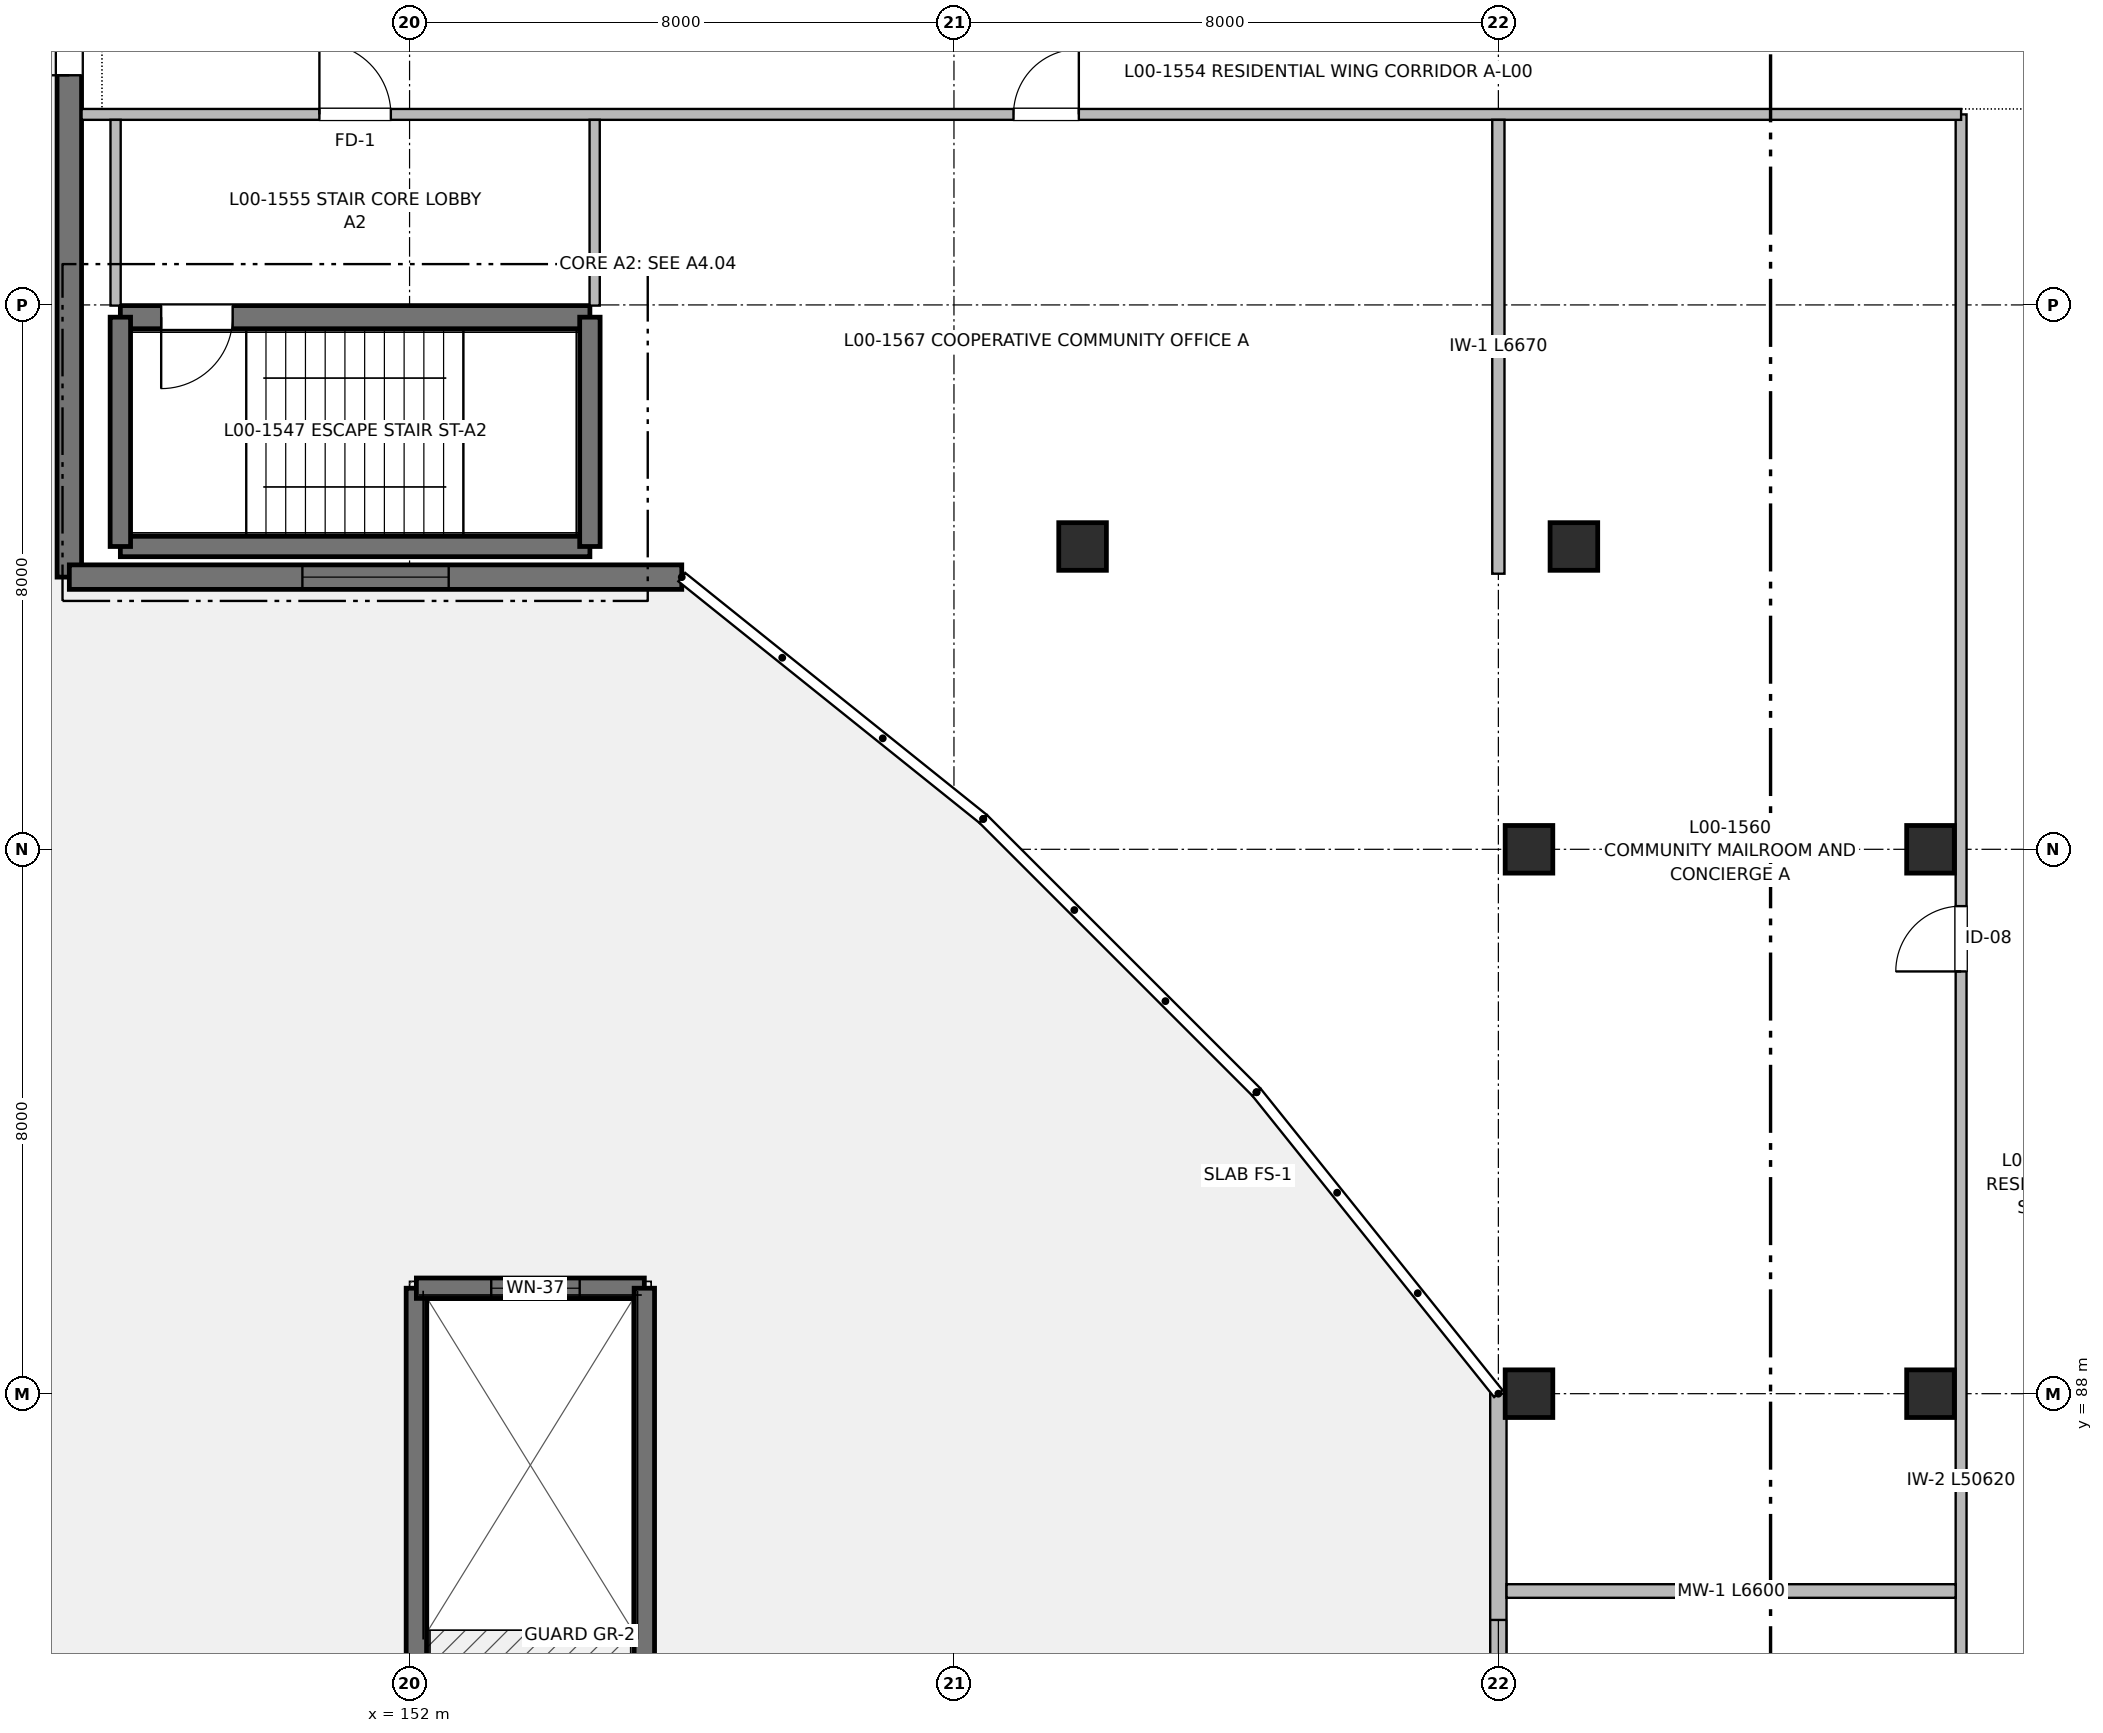
"""IFC4 building model, lengths in metres.
Left out: names, types, materials, properties, quantities, classifications, styles, units other than length and angle.
Written with IfcOpenShell. Run it as: python <this file> out.ifc"""

import sys

from ifc_helpers import new_model, si_unit, direction, frame, frame_2d, origin, origin_2d, place, context, subcontext, project, spatial, rectangle, extrude, element, fill, save


model = new_model("IFC4")
c1 = context("Model", 3, precision=1e-05, world=origin(), true_north=direction((0.0, 1.0)))
c2 = subcontext(c1, "Body", "Model", "MODEL_VIEW")
j1 = project(units=[si_unit("LENGTHUNIT", "METRE"), si_unit("PLANEANGLEUNIT", "RADIAN")], contexts=[c1])
p1 = place(None, origin())
s1 = spatial("IfcSite", under=j1, at=p1, CompositionType="ELEMENT")
p2 = place(p1, origin())
s2 = spatial("IfcBuilding", under=s1, at=p2, CompositionType="ELEMENT")
p3 = place(p2, origin())
s3 = spatial("IfcBuildingStorey", under=s2, at=p3, CompositionType="ELEMENT", Elevation=0.0)
for number, where, z_axis, x_axis in (
    (1, (161.89, 100.45, 0.0), (0.0, 0.0, 1.0), (1.0, 0.0, 0.0)),
    (2, (168.45, 88.0, 0.0), (0.0, 0.0, 1.0), (1.0, 0.0, 0.0)),
    (3, (168.45, 96.0, 0.0), (0.0, 0.0, 1.0), (1.0, 0.0, 0.0)),
    (4, (169.11, 100.45, 0.0), (0.0, 0.0, 1.0), (1.0, 0.0, 0.0)),
    (5, (174.35, 88.0, 0.0), (0.0, 0.0, 1.0), (1.0, 0.0, 0.0)),
    (6, (174.35, 96.0, 0.0), (0.0, 0.0, 1.0), (1.0, 0.0, 0.0)),
):
    element("IfcColumn", number, at=place(p3, frame(where, z_axis=z_axis, x_axis=x_axis)), inside=s3, PredefinedType="COLUMN", context=c2, shape_type="SweptSolid", body=[
        extrude(rectangle(XDim=0.7, YDim=0.7, at=origin_2d()), origin(), (0.0, 0.0, 1.0), 4.16),
    ])
p4 = place(p3, frame((152.1, 82.65, 0.0), z_axis=(0.0, 0.0, 1.0), x_axis=(0.0, 1.0, 0.0)))
e7 = element("IfcWall", 7, at=p4, inside=s3, PredefinedType="SHEAR", context=c2, shape_type="SweptSolid", body=[
    extrude(rectangle(XDim=6.9, YDim=0.3, at=frame_2d((3.45, 0.0))), origin(), (0.0, 0.0, 1.0), 2.65),
])
p5 = place(p3, frame((152.1, 89.55, 0.0), z_axis=(0.0, 0.0, 1.0), x_axis=(1.0, 0.0, 0.0)))
e8 = element("IfcWall", 8, at=p5, inside=s3, PredefinedType="SHEAR", context=c2, shape_type="SweptSolid", body=[
    extrude(rectangle(XDim=3.35, YDim=0.3, at=frame_2d((1.675, 0.0))), origin(), (0.0, 0.0, 1.0), 2.65),
])
p6 = place(p5, frame((1.1, 0.0, 1.45)))
e9 = element("IfcOpeningElement", 9, at=p6, cuts=e8, PredefinedType="OPENING", context=c2, shape_type="SweptSolid", body=[
    extrude(rectangle(XDim=1.3, YDim=0.85, at=frame_2d((0.65, 0.425))), frame((0.0, 0.16, 0.0), z_axis=(0.0, -1.0, 0.0), x_axis=(1.0, 0.0, 0.0)), (0.0, 0.0, 1.0), 0.32),
])
p7 = place(p3, frame((155.45, 89.55, 0.0), z_axis=(0.0, 0.0, 1.0), x_axis=(0.0, -1.0, 0.0)))
e10 = element("IfcWall", 10, at=p7, inside=s3, PredefinedType="SHEAR", context=c2, shape_type="SweptSolid", body=[
    extrude(rectangle(XDim=6.9, YDim=0.3, at=frame_2d((3.45, 0.0))), origin(), (0.0, 0.0, 1.0), 2.65),
])
p8 = place(p3, frame((147.75, 100.45, 0.0), z_axis=(0.0, 0.0, 1.0), x_axis=(1.0, 0.0, 0.0)))
e11 = element("IfcWall", 11, at=p8, inside=s3, PredefinedType="SHEAR", context=c2, shape_type="SweptSolid", body=[
    extrude(rectangle(XDim=6.9, YDim=0.3, at=frame_2d((3.45, 0.0))), origin(), (0.0, 0.0, 1.0), 4.16),
])
p9 = place(p3, frame((154.65, 103.82, 0.0), z_axis=(0.0, 0.0, 1.0), x_axis=(-1.0, 0.0, 0.0)))
e12 = element("IfcWall", 12, at=p9, inside=s3, PredefinedType="SHEAR", context=c2, shape_type="SweptSolid", body=[
    extrude(rectangle(XDim=6.9, YDim=0.34, at=frame_2d((3.45, 0.0))), origin(), (0.0, 0.0, 1.0), 4.16),
])
p10 = place(p9, frame((5.25, 0.0, 0.0)))
e13 = element("IfcOpeningElement", 13, at=p10, cuts=e12, PredefinedType="OPENING", context=c2, shape_type="SweptSolid", body=[
    extrude(rectangle(XDim=1.05, YDim=2.15, at=frame_2d((0.525, 1.075))), frame((0.0, 0.18, 0.0), z_axis=(0.0, -1.0, 0.0), x_axis=(1.0, 0.0, 0.0)), (0.0, 0.0, 1.0), 0.36),
])
for number, where, z_axis, x_axis in (
    (14, (147.75, 103.82, 0.0), (0.0, 0.0, 1.0), (0.0, -1.0, 0.0)),
    (15, (154.65, 100.45, 0.0), (0.0, 0.0, 1.0), (0.0, 1.0, 0.0)),
):
    element("IfcWall", number, at=place(p3, frame(where, z_axis=z_axis, x_axis=x_axis)), inside=s3, PredefinedType="SHEAR", context=c2, shape_type="SweptSolid", body=[
        extrude(rectangle(XDim=3.37, YDim=0.3, at=frame_2d((1.685, 0.0))), origin(), (0.0, 0.0, 1.0), 4.16),
    ])
p11 = place(p3, frame((147.0, 100.0, 0.0), z_axis=(0.0, 0.0, 1.0), x_axis=(0.0, 1.0, 0.0)))
e16 = element("IfcWall", 16, at=p11, inside=s3, PredefinedType="SHEAR", context=c2, shape_type="SweptSolid", body=[
    extrude(rectangle(XDim=16.0, YDim=0.36, at=frame_2d((8.0, 0.0))), origin(), (0.0, 0.0, 1.0), 3.94),
])
p12 = place(p11, frame((7.375, 0.0, 0.0)))
e17 = element("IfcOpeningElement", 17, at=p12, cuts=e16, PredefinedType="OPENING", context=c2, shape_type="SweptSolid", body=[
    extrude(rectangle(XDim=1.25, YDim=2.2, at=frame_2d((0.625, 1.1))), frame((0.0, 0.19, 0.0), z_axis=(0.0, -1.0, 0.0), x_axis=(1.0, 0.0, 0.0)), (0.0, 0.0, 1.0), 0.38),
])
p13 = place(p11, frame((11.325, 0.0, 0.95)))
e18 = element("IfcOpeningElement", 18, at=p13, cuts=e16, PredefinedType="OPENING", context=c2, shape_type="SweptSolid", body=[
    extrude(rectangle(XDim=1.35, YDim=1.3, at=frame_2d((0.675, 0.65))), frame((0.0, 0.19, 0.0), z_axis=(0.0, -1.0, 0.0), x_axis=(1.0, 0.0, 0.0)), (0.0, 0.0, 1.0), 0.38),
])
p14 = place(p3, frame((156.0, 100.0, 0.0), z_axis=(0.0, 0.0, 1.0), x_axis=(-1.0, 0.0, 0.0)))
e19 = element("IfcWall", 19, at=p14, inside=s3, PredefinedType="SHEAR", context=c2, shape_type="SweptSolid", body=[
    extrude(rectangle(XDim=9.0, YDim=0.36, at=frame_2d((4.5, 0.0))), origin(), (0.0, 0.0, 1.0), 3.94),
])
p15 = place(p14, frame((3.425, 0.0, 0.95)))
e20 = element("IfcOpeningElement", 20, at=p15, cuts=e19, PredefinedType="OPENING", context=c2, shape_type="SweptSolid", body=[
    extrude(rectangle(XDim=2.15, YDim=1.8, at=frame_2d((1.075, 0.9))), frame((0.0, 0.19, 0.0), z_axis=(0.0, -1.0, 0.0), x_axis=(1.0, 0.0, 0.0)), (0.0, 0.0, 1.0), 0.38),
])
p16 = place(p3, frame((168.0, 56.0, 0.0), z_axis=(0.0, 0.0, 1.0), x_axis=(0.0, 1.0, 0.0)))
e21 = element("IfcWall", 21, at=p16, inside=s3, PredefinedType="SOLIDWALL", context=c2, shape_type="SweptSolid", body=[
    extrude(rectangle(XDim=32.0, YDim=0.24, at=frame_2d((16.0, 0.0))), origin(), (0.0, 0.0, 1.0), 3.94),
])
p17 = place(p16, frame((3.3, 0.0, 0.0)))
e22 = element("IfcOpeningElement", 22, at=p17, cuts=e21, PredefinedType="OPENING", context=c2, shape_type="SweptSolid", body=[
    extrude(rectangle(XDim=1.3, YDim=2.2, at=frame_2d((0.65, 1.1))), frame((0.0, 0.13, 0.0), z_axis=(0.0, -1.0, 0.0), x_axis=(1.0, 0.0, 0.0)), (0.0, 0.0, 1.0), 0.26),
])
p18 = place(p16, frame((11.325, 0.0, 0.95)))
e23 = element("IfcOpeningElement", 23, at=p18, cuts=e21, PredefinedType="OPENING", context=c2, shape_type="SweptSolid", body=[
    extrude(rectangle(XDim=1.35, YDim=1.3, at=frame_2d((0.675, 0.65))), frame((0.0, 0.13, 0.0), z_axis=(0.0, -1.0, 0.0), x_axis=(1.0, 0.0, 0.0)), (0.0, 0.0, 1.0), 0.26),
])
p19 = place(p16, frame((18.925, 0.0, 0.95)))
e24 = element("IfcOpeningElement", 24, at=p19, cuts=e21, PredefinedType="OPENING", context=c2, shape_type="SweptSolid", body=[
    extrude(rectangle(XDim=2.15, YDim=1.8, at=frame_2d((1.075, 0.9))), frame((0.0, 0.13, 0.0), z_axis=(0.0, -1.0, 0.0), x_axis=(1.0, 0.0, 0.0)), (0.0, 0.0, 1.0), 0.26),
])
p20 = place(p16, frame((27.325, 0.0, 0.95)))
e25 = element("IfcOpeningElement", 25, at=p20, cuts=e21, PredefinedType="OPENING", context=c2, shape_type="SweptSolid", body=[
    extrude(rectangle(XDim=1.35, YDim=1.3, at=frame_2d((0.675, 0.65))), frame((0.0, 0.13, 0.0), z_axis=(0.0, -1.0, 0.0), x_axis=(1.0, 0.0, 0.0)), (0.0, 0.0, 1.0), 0.26),
])
p21 = place(p3, frame((174.8, 56.18, 0.0), z_axis=(0.0, 0.0, 1.0), x_axis=(0.0, 1.0, 0.0)))
e26 = element("IfcWall", 26, at=p21, inside=s3, PredefinedType="PARTITIONING", context=c2, shape_type="SweptSolid", body=[
    extrude(rectangle(XDim=50.62, YDim=0.16, at=frame_2d((25.31, 0.0))), origin(), (0.0, 0.0, 1.0), 3.895),
])
p22 = place(p21, frame((3.365, 0.0, 0.0)))
e27 = element("IfcOpeningElement", 27, at=p22, cuts=e26, PredefinedType="OPENING", context=c2, shape_type="SweptSolid", body=[
    extrude(rectangle(XDim=1.1, YDim=2.15, at=frame_2d((0.55, 1.075))), frame((0.0, 0.09, 0.0), z_axis=(0.0, -1.0, 0.0), x_axis=(1.0, 0.0, 0.0)), (0.0, 0.0, 1.0), 0.18),
])
p23 = place(p21, frame((12.37, 0.0, 0.0)))
e28 = element("IfcOpeningElement", 28, at=p23, cuts=e26, PredefinedType="OPENING", context=c2, shape_type="SweptSolid", body=[
    extrude(rectangle(XDim=1.8, YDim=2.25, at=frame_2d((0.9, 1.125))), frame((0.0, 0.09, 0.0), z_axis=(0.0, -1.0, 0.0), x_axis=(1.0, 0.0, 0.0)), (0.0, 0.0, 1.0), 0.18),
])
p24 = place(p21, frame((22.07, 0.0, 0.0)))
e29 = element("IfcOpeningElement", 29, at=p24, cuts=e26, PredefinedType="OPENING", context=c2, shape_type="SweptSolid", body=[
    extrude(rectangle(XDim=1.0, YDim=2.1, at=frame_2d((0.5, 1.05))), frame((0.0, 0.09, 0.0), z_axis=(0.0, -1.0, 0.0), x_axis=(1.0, 0.0, 0.0)), (0.0, 0.0, 1.0), 0.18),
])
p25 = place(p21, frame((38.025, 0.0, 0.0)))
e30 = element("IfcOpeningElement", 30, at=p25, cuts=e26, PredefinedType="OPENING", context=c2, shape_type="SweptSolid", body=[
    extrude(rectangle(XDim=0.96, YDim=2.15, at=frame_2d((0.48, 1.075))), frame((0.0, 0.09, 0.0), z_axis=(0.0, -1.0, 0.0), x_axis=(1.0, 0.0, 0.0)), (0.0, 0.0, 1.0), 0.18),
])
p26 = place(p3, frame((147.18, 106.8, 0.0), z_axis=(0.0, 0.0, 1.0), x_axis=(1.0, 0.0, 0.0)))
e31 = element("IfcWall", 31, at=p26, inside=s3, PredefinedType="PARTITIONING", context=c2, shape_type="SweptSolid", body=[
    extrude(rectangle(XDim=27.62, YDim=0.16, at=frame_2d((13.81, 0.0))), origin(), (0.0, 0.0, 1.0), 3.895),
])
p27 = place(p26, frame((3.495, 0.0, 0.0)))
e32 = element("IfcOpeningElement", 32, at=p27, cuts=e31, PredefinedType="OPENING", context=c2, shape_type="SweptSolid", body=[
    extrude(rectangle(XDim=1.05, YDim=2.15, at=frame_2d((0.525, 1.075))), frame((0.0, 0.09, 0.0), z_axis=(0.0, -1.0, 0.0), x_axis=(1.0, 0.0, 0.0)), (0.0, 0.0, 1.0), 0.18),
])
p28 = place(p26, frame((13.695, 0.0, 0.0)))
e33 = element("IfcOpeningElement", 33, at=p28, cuts=e31, PredefinedType="OPENING", context=c2, shape_type="SweptSolid", body=[
    extrude(rectangle(XDim=0.96, YDim=2.15, at=frame_2d((0.48, 1.075))), frame((0.0, 0.09, 0.0), z_axis=(0.0, -1.0, 0.0), x_axis=(1.0, 0.0, 0.0)), (0.0, 0.0, 1.0), 0.18),
])
p29 = place(p3, frame((168.0, 100.05, 0.0), z_axis=(0.0, 0.0, 1.0), x_axis=(0.0, 1.0, 0.0)))
e34 = element("IfcWall", 34, at=p29, inside=s3, PredefinedType="PARTITIONING", context=c2, shape_type="SweptSolid", body=[
    extrude(rectangle(XDim=6.67, YDim=0.18, at=frame_2d((3.335, 0.0))), origin(), (0.0, 0.0, 1.0), 3.895),
])
for number, where, z_axis, x_axis in (
    (35, (147.68, 103.99, 0.0), (0.0, 0.0, 1.0), (0.0, 1.0, 0.0)),
    (36, (154.72, 103.99, 0.0), (0.0, 0.0, 1.0), (0.0, 1.0, 0.0)),
):
    element("IfcWall", number, at=place(p3, frame(where, z_axis=z_axis, x_axis=x_axis)), inside=s3, PredefinedType="PARTITIONING", context=c2, shape_type="SweptSolid", body=[
        extrude(rectangle(XDim=2.73, YDim=0.15, at=frame_2d((1.365, 0.0))), origin(), (0.0, 0.0, 1.0), 3.895),
    ])
p30 = place(p3, frame((168.12, 85.1, 0.0), z_axis=(0.0, 0.0, 1.0), x_axis=(1.0, 0.0, 0.0)))
e37 = element("IfcWall", 37, at=p30, inside=s3, PredefinedType="SOLIDWALL", context=c2, shape_type="SweptSolid", body=[
    extrude(rectangle(XDim=6.6, YDim=0.2, at=frame_2d((3.3, 0.0))), origin(), (0.0, 0.0, 1.0), 3.895),
])
p31 = place(p6, origin())
e38 = element("IfcWindow", 38, at=p31, inside=s3, PartitioningType="SINGLE_PANEL", PredefinedType="WINDOW", context=c2, shape_type="SweptSolid", body=[
    extrude(rectangle(XDim=1.3, YDim=0.85, at=frame_2d((0.65, 0.425))), frame((0.0, 0.03, 0.0), z_axis=(0.0, -1.0, 0.0), x_axis=(1.0, 0.0, 0.0)), (0.0, 0.0, 1.0), 0.06),
])
fill(e9, e38)
p32 = place(p10, origin())
e39 = element("IfcDoor", 39, at=p32, inside=s3, OperationType="SINGLE_SWING_RIGHT", PredefinedType="DOOR", context=c2, shape_type="SweptSolid", body=[
    extrude(rectangle(XDim=1.05, YDim=2.15, at=frame_2d((0.525, 1.075))), frame((0.0, 0.025, 0.0), z_axis=(0.0, -1.0, 0.0), x_axis=(1.0, 0.0, 0.0)), (0.0, 0.0, 1.0), 0.05),
])
fill(e13, e39)
p33 = place(p12, origin())
e40 = element("IfcDoor", 40, at=p33, inside=s3, OperationType="SINGLE_SWING_LEFT", PredefinedType="DOOR", context=c2, shape_type="SweptSolid", body=[
    extrude(rectangle(XDim=1.25, YDim=2.2, at=frame_2d((0.625, 1.1))), frame((0.0, 0.025, 0.0), z_axis=(0.0, -1.0, 0.0), x_axis=(1.0, 0.0, 0.0)), (0.0, 0.0, 1.0), 0.05),
])
fill(e17, e40)
p34 = place(p15, origin())
e41 = element("IfcWindow", 41, at=p34, inside=s3, PartitioningType="SINGLE_PANEL", PredefinedType="WINDOW", context=c2, shape_type="SweptSolid", body=[
    extrude(rectangle(XDim=2.15, YDim=1.8, at=frame_2d((1.075, 0.9))), frame((0.0, 0.03, 0.0), z_axis=(0.0, -1.0, 0.0), x_axis=(1.0, 0.0, 0.0)), (0.0, 0.0, 1.0), 0.06),
])
fill(e20, e41)
p35 = place(p20, origin())
e42 = element("IfcWindow", 42, at=p35, inside=s3, PartitioningType="SINGLE_PANEL", PredefinedType="WINDOW", context=c2, shape_type="SweptSolid", body=[
    extrude(rectangle(XDim=1.35, YDim=1.3, at=frame_2d((0.675, 0.65))), frame((0.0, 0.03, 0.0), z_axis=(0.0, -1.0, 0.0), x_axis=(1.0, 0.0, 0.0)), (0.0, 0.0, 1.0), 0.06),
])
fill(e25, e42)
p36 = place(p27, origin())
e43 = element("IfcDoor", 43, at=p36, inside=s3, OperationType="SINGLE_SWING_LEFT", PredefinedType="DOOR", context=c2, shape_type="SweptSolid", body=[
    extrude(rectangle(XDim=1.05, YDim=2.15, at=frame_2d((0.525, 1.075))), frame((0.0, 0.025, 0.0), z_axis=(0.0, -1.0, 0.0), x_axis=(1.0, 0.0, 0.0)), (0.0, 0.0, 1.0), 0.05),
])
fill(e32, e43)
p37 = place(p25, origin())
e44 = element("IfcDoor", 44, at=p37, inside=s3, OperationType="SINGLE_SWING_LEFT", PredefinedType="DOOR", context=c2, shape_type="SweptSolid", body=[
    extrude(rectangle(XDim=0.96, YDim=2.15, at=frame_2d((0.48, 1.075))), frame((0.0, 0.025, 0.0), z_axis=(0.0, -1.0, 0.0), x_axis=(1.0, 0.0, 0.0)), (0.0, 0.0, 1.0), 0.05),
])
fill(e30, e44)
p38 = place(p28, origin())
e45 = element("IfcDoor", 45, at=p38, inside=s3, OperationType="SINGLE_SWING_RIGHT", PredefinedType="DOOR", context=c2, shape_type="SweptSolid", body=[
    extrude(rectangle(XDim=0.96, YDim=2.15, at=frame_2d((0.48, 1.075))), frame((0.0, 0.025, 0.0), z_axis=(0.0, -1.0, 0.0), x_axis=(1.0, 0.0, 0.0)), (0.0, 0.0, 1.0), 0.05),
])
fill(e33, e45)
save(model, sys.argv[1])
